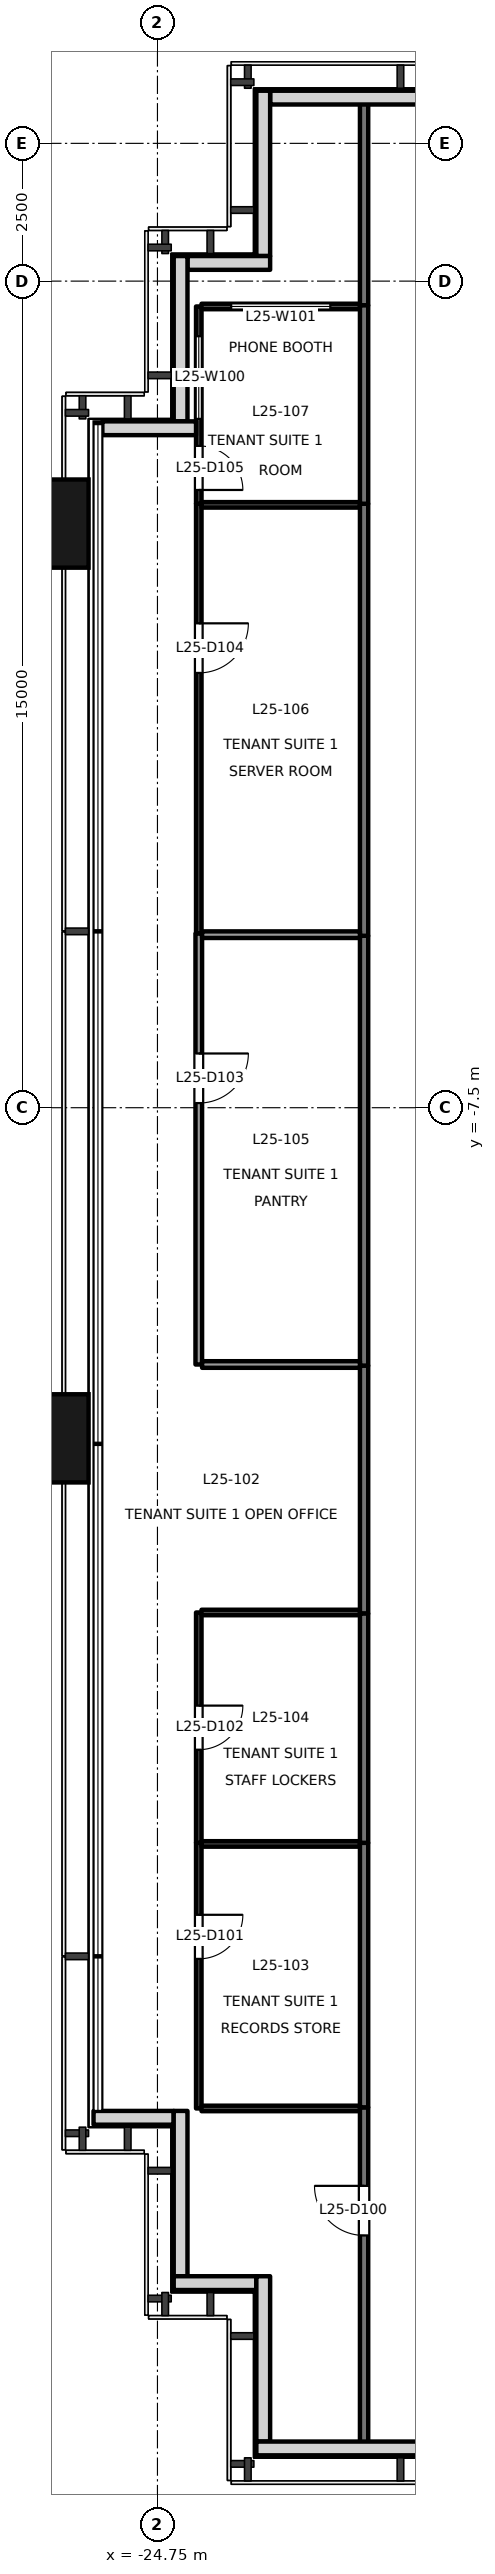
"""IFC4 building model, lengths in metres.
Left out: names, types, materials, properties, quantities, classifications, styles, units other than length and angle.
Written with IfcOpenShell. Run it as: python <this file> out.ifc"""

import sys

from ifc_helpers import new_model, si_unit, direction, frame, frame_2d, origin, origin_2d, place, context, subcontext, project, spatial, rectangle, extrude, element, fill, save


model = new_model("IFC4")
c1 = context("Model", 3, precision=1e-05, world=origin(), true_north=direction((0.0, 1.0)))
c2 = subcontext(c1, "Body", "Model", "MODEL_VIEW")
j1 = project(units=[si_unit("LENGTHUNIT", "METRE"), si_unit("PLANEANGLEUNIT", "RADIAN")], contexts=[c1])
p1 = place(None, origin())
s1 = spatial("IfcSite", under=j1, at=p1, CompositionType="ELEMENT")
p2 = place(p1, origin())
s2 = spatial("IfcBuilding", under=s1, at=p2, CompositionType="ELEMENT")
p3 = place(p2, frame((0.0, 0.0, 111.7)))
s3 = spatial("IfcBuildingStorey", under=s2, at=p3, CompositionType="ELEMENT", Elevation=111.7)
for number, where, z_axis, x_axis in (
    (1, (-26.9, -13.5, -0.2), (0.0, 0.0, 1.0), (0.0, 1.0, 0.0)),
    (2, (-26.9, 3.1, -0.2), (0.0, 0.0, 1.0), (0.0, 1.0, 0.0)),
):
    element("IfcColumn", number, at=place(p3, frame(where, z_axis=z_axis, x_axis=x_axis)), inside=s3, PredefinedType="COLUMN", context=c2, shape_type="SweptSolid", body=[
        extrude(rectangle(XDim=1.6, YDim=1.8, at=origin_2d()), origin(), (0.0, 0.0, 1.0), 4.0),
    ])
p4 = place(p3, frame((-20.0, 10.83, 0.0), z_axis=(0.0, 0.0, 1.0), x_axis=(-1.0, 0.0, 0.0)))
e3 = element("IfcWall", 3, at=p4, inside=s3, PredefinedType="SOLIDWALL", context=c2, shape_type="SweptSolid", body=[
    extrude(rectangle(XDim=2.705, YDim=0.25, at=frame_2d((1.353, 0.0))), origin(), (0.0, 0.0, 1.0), 3.8),
])
p5 = place(p3, frame((-22.83, 10.955, 0.0), z_axis=(0.0, 0.0, 1.0), x_axis=(0.0, -1.0, 0.0)))
e4 = element("IfcWall", 4, at=p5, inside=s3, PredefinedType="SOLIDWALL", context=c2, shape_type="SweptSolid", body=[
    extrude(rectangle(XDim=3.0, YDim=0.25, at=frame_2d((1.5, 0.0))), origin(), (0.0, 0.0, 1.0), 3.8),
])
p6 = place(p3, frame((-22.705, 7.83, 0.0), z_axis=(0.0, 0.0, 1.0), x_axis=(-1.0, 0.0, 0.0)))
e5 = element("IfcWall", 5, at=p6, inside=s3, PredefinedType="SOLIDWALL", context=c2, shape_type="SweptSolid", body=[
    extrude(rectangle(XDim=1.5, YDim=0.25, at=frame_2d((0.75, 0.0))), origin(), (0.0, 0.0, 1.0), 3.8),
])
p7 = place(p3, frame((-24.33, 7.955, 0.0), z_axis=(0.0, 0.0, 1.0), x_axis=(0.0, -1.0, 0.0)))
e6 = element("IfcWall", 6, at=p7, inside=s3, PredefinedType="SOLIDWALL", context=c2, shape_type="SweptSolid", body=[
    extrude(rectangle(XDim=3.0, YDim=0.25, at=frame_2d((1.5, 0.0))), origin(), (0.0, 0.0, 1.0), 3.8),
])
p8 = place(p3, frame((-24.05, 4.83, 0.0), z_axis=(0.0, 0.0, 1.0), x_axis=(-1.0, 0.0, 0.0)))
e7 = element("IfcWall", 7, at=p8, inside=s3, PredefinedType="SOLIDWALL", context=c2, shape_type="SweptSolid", body=[
    extrude(rectangle(XDim=1.7, YDim=0.25, at=frame_2d((0.85, 0.0))), origin(), (0.0, 0.0, 1.0), 3.8),
])
p9 = place(p3, frame((-25.91, -25.83, 0.0), z_axis=(0.0, 0.0, 1.0), x_axis=(1.0, 0.0, 0.0)))
e8 = element("IfcWall", 8, at=p9, inside=s3, PredefinedType="SOLIDWALL", context=c2, shape_type="SweptSolid", body=[
    extrude(rectangle(XDim=1.455, YDim=0.25, at=frame_2d((0.728, 0.0))), origin(), (0.0, 0.0, 1.0), 3.8),
])
p10 = place(p3, frame((-24.33, -25.705, 0.0), z_axis=(0.0, 0.0, 1.0), x_axis=(0.0, -1.0, 0.0)))
e9 = element("IfcWall", 9, at=p10, inside=s3, PredefinedType="SOLIDWALL", context=c2, shape_type="SweptSolid", body=[
    extrude(rectangle(XDim=3.0, YDim=0.25, at=frame_2d((1.5, 0.0))), origin(), (0.0, 0.0, 1.0), 3.8),
])
p11 = place(p3, frame((-24.455, -28.83, 0.0), z_axis=(0.0, 0.0, 1.0), x_axis=(1.0, 0.0, 0.0)))
e10 = element("IfcWall", 10, at=p11, inside=s3, PredefinedType="SOLIDWALL", context=c2, shape_type="SweptSolid", body=[
    extrude(rectangle(XDim=1.5, YDim=0.25, at=frame_2d((0.75, 0.0))), origin(), (0.0, 0.0, 1.0), 3.8),
])
p12 = place(p3, frame((-22.83, -28.705, 0.0), z_axis=(0.0, 0.0, 1.0), x_axis=(0.0, -1.0, 0.0)))
e11 = element("IfcWall", 11, at=p12, inside=s3, PredefinedType="SOLIDWALL", context=c2, shape_type="SweptSolid", body=[
    extrude(rectangle(XDim=3.0, YDim=0.25, at=frame_2d((1.5, 0.0))), origin(), (0.0, 0.0, 1.0), 3.8),
])
p13 = place(p3, frame((-22.955, -31.83, 0.0), z_axis=(0.0, 0.0, 1.0), x_axis=(1.0, 0.0, 0.0)))
e12 = element("IfcWall", 12, at=p13, inside=s3, PredefinedType="SOLIDWALL", context=c2, shape_type="SweptSolid", body=[
    extrude(rectangle(XDim=2.955, YDim=0.25, at=frame_2d((1.478, 0.0))), origin(), (0.0, 0.0, 1.0), 3.8),
])
p14 = place(p3, frame((-21.0, 7.06, 0.0), z_axis=(0.0, 0.0, 1.0), x_axis=(0.0, 1.0, 0.0)))
e13 = element("IfcWall", 13, at=p14, inside=s3, PredefinedType="PARTITIONING", context=c2, shape_type="SweptSolid", body=[
    extrude(rectangle(XDim=3.68, YDim=0.15, at=frame_2d((1.84, 0.0))), origin(), (0.0, 0.0, 1.0), 3.8),
])
p15 = place(p3, frame((-21.0, -31.74, 0.0), z_axis=(0.0, 0.0, 1.0), x_axis=(0.0, 1.0, 0.0)))
e14 = element("IfcWall", 14, at=p15, inside=s3, PredefinedType="PARTITIONING", context=c2, shape_type="SweptSolid", body=[
    extrude(rectangle(XDim=6.1, YDim=0.15, at=frame_2d((3.05, 0.0))), origin(), (0.0, 0.0, 1.0), 3.8),
])
p16 = place(p15, frame((3.775, 0.0, 0.0)))
e15 = element("IfcOpeningElement", 15, at=p16, cuts=e14, PredefinedType="OPENING", context=c2, shape_type="SweptSolid", body=[
    extrude(rectangle(XDim=0.9, YDim=2.1, at=frame_2d((0.45, 1.05))), frame((0.0, 0.085, 0.0), z_axis=(0.0, -1.0, 0.0), x_axis=(1.0, 0.0, 0.0)), (0.0, 0.0, 1.0), 0.171),
])
p17 = place(p3, frame((-21.0, -16.68, 0.0), z_axis=(0.0, 0.0, 1.0), x_axis=(0.0, 1.0, 0.0)))
e16 = element("IfcWall", 16, at=p17, inside=s3, PredefinedType="PARTITIONING", context=c2, shape_type="SweptSolid", body=[
    extrude(rectangle(XDim=4.5, YDim=0.15, at=frame_2d((2.25, 0.0))), origin(), (0.0, 0.0, 1.0), 3.8),
])
p18 = place(p3, frame((-21.0, -25.64, 0.0), z_axis=(0.0, 0.0, 1.0), x_axis=(0.0, 1.0, 0.0)))
e17 = element("IfcWall", 17, at=p18, inside=s3, PredefinedType="PARTITIONING", context=c2, shape_type="SweptSolid", body=[
    extrude(rectangle(XDim=4.8, YDim=0.15, at=frame_2d((2.4, 0.0))), origin(), (0.0, 0.0, 1.0), 3.8),
])
p19 = place(p3, frame((-21.0, -20.84, 0.0), z_axis=(0.0, 0.0, 1.0), x_axis=(0.0, 1.0, 0.0)))
e18 = element("IfcWall", 18, at=p19, inside=s3, PredefinedType="PARTITIONING", context=c2, shape_type="SweptSolid", body=[
    extrude(rectangle(XDim=4.16, YDim=0.15, at=frame_2d((2.08, 0.0))), origin(), (0.0, 0.0, 1.0), 3.8),
])
p20 = place(p3, frame((-21.0, -12.18, 0.0), z_axis=(0.0, 0.0, 1.0), x_axis=(0.0, 1.0, 0.0)))
e19 = element("IfcWall", 19, at=p20, inside=s3, PredefinedType="PARTITIONING", context=c2, shape_type="SweptSolid", body=[
    extrude(rectangle(XDim=7.8, YDim=0.15, at=frame_2d((3.9, 0.0))), origin(), (0.0, 0.0, 1.0), 3.4),
])
p21 = place(p3, frame((-21.0, -4.38, 0.0), z_axis=(0.0, 0.0, 1.0), x_axis=(0.0, 1.0, 0.0)))
e20 = element("IfcWall", 20, at=p21, inside=s3, PredefinedType="PARTITIONING", context=c2, shape_type="SweptSolid", body=[
    extrude(rectangle(XDim=7.84, YDim=0.15, at=frame_2d((3.92, 0.0))), origin(), (0.0, 0.0, 1.0), 3.4),
])
p22 = place(p3, frame((-21.0, 3.46, 0.0), z_axis=(0.0, 0.0, 1.0), x_axis=(0.0, 1.0, 0.0)))
e21 = element("IfcWall", 21, at=p22, inside=s3, PredefinedType="PARTITIONING", context=c2, shape_type="SweptSolid", body=[
    extrude(rectangle(XDim=3.6, YDim=0.15, at=frame_2d((1.8, 0.0))), origin(), (0.0, 0.0, 1.0), 3.4),
])
p23 = place(p3, frame((-24.0, -20.84, 0.0), z_axis=(0.0, 0.0, 1.0), x_axis=(0.0, -1.0, 0.0)))
e22 = element("IfcWall", 22, at=p23, inside=s3, PredefinedType="PARTITIONING", context=c2, shape_type="SweptSolid", body=[
    extrude(rectangle(XDim=4.82, YDim=0.1, at=frame_2d((2.41, 0.0))), origin(), (0.0, 0.0, 1.0), 3.8),
])
p24 = place(p23, frame((1.306, 0.0, 0.0)))
e23 = element("IfcOpeningElement", 23, at=p24, cuts=e22, PredefinedType="OPENING", context=c2, shape_type="SweptSolid", body=[
    extrude(rectangle(XDim=0.8, YDim=2.1, at=frame_2d((0.4, 1.05))), frame((0.0, 0.061, 0.0), z_axis=(0.0, -1.0, 0.0), x_axis=(1.0, 0.0, 0.0)), (0.0, 0.0, 1.0), 0.121),
])
p25 = place(p3, frame((-23.95, -25.66, 0.0), z_axis=(0.0, 0.0, 1.0), x_axis=(1.0, 0.0, 0.0)))
e24 = element("IfcWall", 24, at=p25, inside=s3, PredefinedType="PARTITIONING", context=c2, shape_type="SweptSolid", body=[
    extrude(rectangle(XDim=2.875, YDim=0.1, at=frame_2d((1.438, 0.0))), origin(), (0.0, 0.0, 1.0), 3.8),
])
p26 = place(p3, frame((-24.0, -16.66, 0.0), z_axis=(0.0, 0.0, 1.0), x_axis=(0.0, -1.0, 0.0)))
e25 = element("IfcWall", 25, at=p26, inside=s3, PredefinedType="PARTITIONING", context=c2, shape_type="SweptSolid", body=[
    extrude(rectangle(XDim=4.18, YDim=0.1, at=frame_2d((2.09, 0.0))), origin(), (0.0, 0.0, 1.0), 3.8),
])
p27 = place(p26, frame((1.69, 0.0, 0.0)))
e26 = element("IfcOpeningElement", 26, at=p27, cuts=e25, PredefinedType="OPENING", context=c2, shape_type="SweptSolid", body=[
    extrude(rectangle(XDim=0.8, YDim=2.1, at=frame_2d((0.4, 1.05))), frame((0.0, 0.061, 0.0), z_axis=(0.0, -1.0, 0.0), x_axis=(1.0, 0.0, 0.0)), (0.0, 0.0, 1.0), 0.121),
])
p28 = place(p3, frame((-21.075, -16.66, 0.0), z_axis=(0.0, 0.0, 1.0), x_axis=(-1.0, 0.0, 0.0)))
e27 = element("IfcWall", 27, at=p28, inside=s3, PredefinedType="PARTITIONING", context=c2, shape_type="SweptSolid", body=[
    extrude(rectangle(XDim=2.875, YDim=0.1, at=frame_2d((1.438, 0.0))), origin(), (0.0, 0.0, 1.0), 3.8),
])
p29 = place(p3, frame((-24.0, -4.34, 0.0), z_axis=(0.0, 0.0, 1.0), x_axis=(0.0, -1.0, 0.0)))
e28 = element("IfcWall", 28, at=p29, inside=s3, PredefinedType="PARTITIONING", context=c2, shape_type="SweptSolid", body=[
    extrude(rectangle(XDim=7.82, YDim=0.12, at=frame_2d((3.91, 0.0))), origin(), (0.0, 0.0, 1.0), 3.4),
])
p30 = place(p29, frame((2.176, 0.0, 0.0)))
e29 = element("IfcOpeningElement", 29, at=p30, cuts=e28, PredefinedType="OPENING", context=c2, shape_type="SweptSolid", body=[
    extrude(rectangle(XDim=0.9, YDim=2.1, at=frame_2d((0.45, 1.05))), frame((0.0, 0.071, 0.0), z_axis=(0.0, -1.0, 0.0), x_axis=(1.0, 0.0, 0.0)), (0.0, 0.0, 1.0), 0.141),
])
p31 = place(p3, frame((-23.94, -12.16, 0.0), z_axis=(0.0, 0.0, 1.0), x_axis=(1.0, 0.0, 0.0)))
e30 = element("IfcWall", 30, at=p31, inside=s3, PredefinedType="PARTITIONING", context=c2, shape_type="SweptSolid", body=[
    extrude(rectangle(XDim=2.865, YDim=0.12, at=frame_2d((1.433, 0.0))), origin(), (0.0, 0.0, 1.0), 3.8),
])
p32 = place(p3, frame((-24.0, 3.46, 0.0), z_axis=(0.0, 0.0, 1.0), x_axis=(0.0, -1.0, 0.0)))
e31 = element("IfcWall", 31, at=p32, inside=s3, PredefinedType="PARTITIONING", context=c2, shape_type="SweptSolid", body=[
    extrude(rectangle(XDim=7.8, YDim=0.1, at=frame_2d((3.9, 0.0))), origin(), (0.0, 0.0, 1.0), 3.4),
])
p33 = place(p32, frame((2.17, 0.0, 0.0)))
e32 = element("IfcOpeningElement", 32, at=p33, cuts=e31, PredefinedType="OPENING", context=c2, shape_type="SweptSolid", body=[
    extrude(rectangle(XDim=0.9, YDim=2.1, at=frame_2d((0.45, 1.05))), frame((0.0, 0.061, 0.0), z_axis=(0.0, -1.0, 0.0), x_axis=(1.0, 0.0, 0.0)), (0.0, 0.0, 1.0), 0.121),
])
p34 = place(p3, frame((-24.0, 7.04, 0.0), z_axis=(0.0, 0.0, 1.0), x_axis=(0.0, -1.0, 0.0)))
e33 = element("IfcWall", 33, at=p34, inside=s3, PredefinedType="PARTITIONING", context=c2, shape_type="SweptSolid", body=[
    extrude(rectangle(XDim=3.58, YDim=0.1, at=frame_2d((1.79, 0.0))), origin(), (0.0, 0.0, 1.0), 3.4),
])
p35 = place(p34, frame((2.53, 0.0, 0.0)))
e34 = element("IfcOpeningElement", 34, at=p35, cuts=e33, PredefinedType="OPENING", context=c2, shape_type="SweptSolid", body=[
    extrude(rectangle(XDim=0.8, YDim=2.1, at=frame_2d((0.4, 1.05))), frame((0.0, 0.061, 0.0), z_axis=(0.0, -1.0, 0.0), x_axis=(1.0, 0.0, 0.0)), (0.0, 0.0, 1.0), 0.121),
])
p36 = place(p34, frame((0.54, 0.0, 0.9)))
e35 = element("IfcOpeningElement", 35, at=p36, cuts=e33, PredefinedType="OPENING", context=c2, shape_type="SweptSolid", body=[
    extrude(rectangle(XDim=1.5, YDim=1.2, at=frame_2d((0.75, 0.6))), frame((0.0, 0.061, 0.0), z_axis=(0.0, -1.0, 0.0), x_axis=(1.0, 0.0, 0.0)), (0.0, 0.0, 1.0), 0.121),
])
p37 = place(p3, frame((-21.075, 7.04, 0.0), z_axis=(0.0, 0.0, 1.0), x_axis=(-1.0, 0.0, 0.0)))
e36 = element("IfcWall", 36, at=p37, inside=s3, PredefinedType="PARTITIONING", context=c2, shape_type="SweptSolid", body=[
    extrude(rectangle(XDim=2.875, YDim=0.1, at=frame_2d((1.438, 0.0))), origin(), (0.0, 0.0, 1.0), 3.8),
])
p38 = place(p37, frame((0.537, 0.0, 0.9)))
e37 = element("IfcOpeningElement", 37, at=p38, cuts=e36, PredefinedType="OPENING", context=c2, shape_type="SweptSolid", body=[
    extrude(rectangle(XDim=1.8, YDim=1.2, at=frame_2d((0.9, 0.6))), frame((0.0, 0.061, 0.0), z_axis=(0.0, -1.0, 0.0), x_axis=(1.0, 0.0, 0.0)), (0.0, 0.0, 1.0), 0.121),
])
p39 = place(p3, frame((-23.95, -20.86, 0.0), z_axis=(0.0, 0.0, 1.0), x_axis=(1.0, 0.0, 0.0)))
e38 = element("IfcWall", 38, at=p39, inside=s3, PredefinedType="PARTITIONING", context=c2, shape_type="SweptSolid", body=[
    extrude(rectangle(XDim=2.875, YDim=0.1, at=frame_2d((1.438, 0.0))), origin(), (0.0, 0.0, 1.0), 3.8),
])
p40 = place(p3, frame((-23.94, -4.36, 0.0), z_axis=(0.0, 0.0, 1.0), x_axis=(1.0, 0.0, 0.0)))
e39 = element("IfcWall", 39, at=p40, inside=s3, PredefinedType="PARTITIONING", context=c2, shape_type="SweptSolid", body=[
    extrude(rectangle(XDim=2.865, YDim=0.12, at=frame_2d((1.433, 0.0))), origin(), (0.0, 0.0, 1.0), 3.4),
])
p41 = place(p3, frame((-23.95, 3.44, 0.0), z_axis=(0.0, 0.0, 1.0), x_axis=(1.0, 0.0, 0.0)))
e40 = element("IfcWall", 40, at=p41, inside=s3, PredefinedType="PARTITIONING", context=c2, shape_type="SweptSolid", body=[
    extrude(rectangle(XDim=2.875, YDim=0.1, at=frame_2d((1.438, 0.0))), origin(), (0.0, 0.0, 1.0), 3.8),
])
p42 = place(p16, origin())
e41 = element("IfcDoor", 41, at=p42, inside=s3, OperationType="SINGLE_SWING_RIGHT", PredefinedType="DOOR", context=c2, shape_type="SweptSolid", body=[
    extrude(rectangle(XDim=0.9, YDim=2.1, at=frame_2d((0.45, 1.05))), frame((0.0, 0.025, 0.0), z_axis=(0.0, -1.0, 0.0), x_axis=(1.0, 0.0, 0.0)), (0.0, 0.0, 1.0), 0.05),
])
fill(e15, e41)
p43 = place(p24, origin())
e42 = element("IfcDoor", 42, at=p43, inside=s3, OperationType="SINGLE_SWING_LEFT", PredefinedType="DOOR", context=c2, shape_type="SweptSolid", body=[
    extrude(rectangle(XDim=0.8, YDim=2.1, at=frame_2d((0.4, 1.05))), frame((0.0, 0.025, 0.0), z_axis=(0.0, -1.0, 0.0), x_axis=(1.0, 0.0, 0.0)), (0.0, 0.0, 1.0), 0.05),
])
fill(e23, e42)
p44 = place(p27, origin())
e43 = element("IfcDoor", 43, at=p44, inside=s3, OperationType="SINGLE_SWING_LEFT", PredefinedType="DOOR", context=c2, shape_type="SweptSolid", body=[
    extrude(rectangle(XDim=0.8, YDim=2.1, at=frame_2d((0.4, 1.05))), frame((0.0, 0.025, 0.0), z_axis=(0.0, -1.0, 0.0), x_axis=(1.0, 0.0, 0.0)), (0.0, 0.0, 1.0), 0.05),
])
fill(e26, e43)
p45 = place(p30, origin())
e44 = element("IfcDoor", 44, at=p45, inside=s3, OperationType="SINGLE_SWING_LEFT", PredefinedType="DOOR", context=c2, shape_type="SweptSolid", body=[
    extrude(rectangle(XDim=0.9, YDim=2.1, at=frame_2d((0.45, 1.05))), frame((0.0, 0.025, 0.0), z_axis=(0.0, -1.0, 0.0), x_axis=(1.0, 0.0, 0.0)), (0.0, 0.0, 1.0), 0.05),
])
fill(e29, e44)
p46 = place(p33, origin())
e45 = element("IfcDoor", 45, at=p46, inside=s3, OperationType="SINGLE_SWING_LEFT", PredefinedType="DOOR", context=c2, shape_type="SweptSolid", body=[
    extrude(rectangle(XDim=0.9, YDim=2.1, at=frame_2d((0.45, 1.05))), frame((0.0, 0.025, 0.0), z_axis=(0.0, -1.0, 0.0), x_axis=(1.0, 0.0, 0.0)), (0.0, 0.0, 1.0), 0.05),
])
fill(e32, e45)
p47 = place(p35, origin())
e46 = element("IfcDoor", 46, at=p47, inside=s3, OperationType="SINGLE_SWING_RIGHT", PredefinedType="DOOR", context=c2, shape_type="SweptSolid", body=[
    extrude(rectangle(XDim=0.8, YDim=2.1, at=frame_2d((0.4, 1.05))), frame((0.0, 0.025, 0.0), z_axis=(0.0, -1.0, 0.0), x_axis=(1.0, 0.0, 0.0)), (0.0, 0.0, 1.0), 0.05),
])
fill(e34, e46)
p48 = place(p36, origin())
e47 = element("IfcWindow", 47, at=p48, inside=s3, PartitioningType="SINGLE_PANEL", PredefinedType="WINDOW", context=c2, shape_type="SweptSolid", body=[
    extrude(rectangle(XDim=1.5, YDim=1.2, at=frame_2d((0.75, 0.6))), frame((0.0, 0.03, 0.0), z_axis=(0.0, -1.0, 0.0), x_axis=(1.0, 0.0, 0.0)), (0.0, 0.0, 1.0), 0.06),
])
fill(e35, e47)
p49 = place(p38, origin())
e48 = element("IfcWindow", 48, at=p49, inside=s3, PartitioningType="SINGLE_PANEL", PredefinedType="WINDOW", context=c2, shape_type="SweptSolid", body=[
    extrude(rectangle(XDim=1.8, YDim=1.2, at=frame_2d((0.9, 0.6))), frame((0.0, 0.03, 0.0), z_axis=(0.0, -1.0, 0.0), x_axis=(1.0, 0.0, 0.0)), (0.0, 0.0, 1.0), 0.06),
])
fill(e37, e48)
save(model, sys.argv[1])
